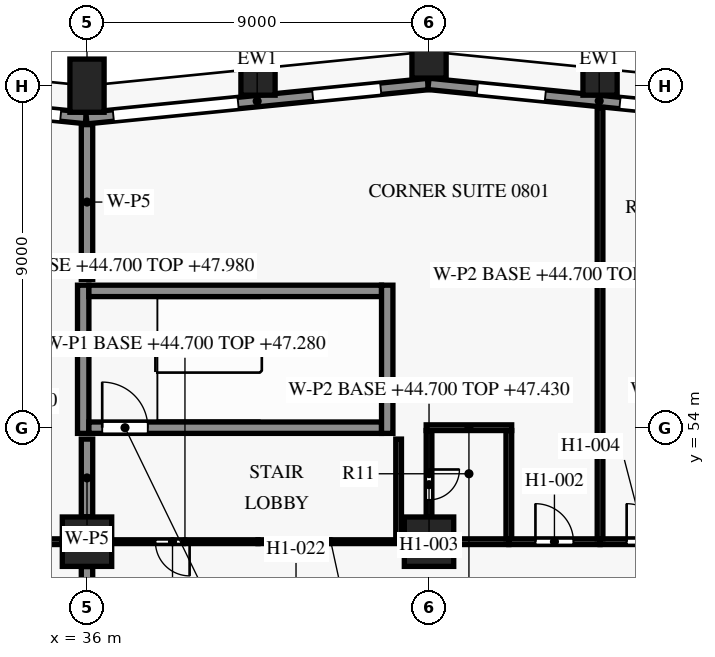
"""IFC4 building model, lengths in metres.
Left out: names, types, materials, properties, quantities, classifications, styles, units other than length and angle.
Written with IfcOpenShell. Run it as: python <this file> out.ifc"""

import sys

from ifc_helpers import new_model, si_unit, direction, frame, frame_2d, origin, origin_2d, place, context, subcontext, project, spatial, rectangle, extrude, element, fill, save


model = new_model("IFC4")
c1 = context("Model", 3, precision=1e-05, world=origin(), true_north=direction((0.0, 1.0)))
c2 = subcontext(c1, "Body", "Model", "MODEL_VIEW")
j1 = project(units=[si_unit("LENGTHUNIT", "METRE"), si_unit("PLANEANGLEUNIT", "RADIAN")], contexts=[c1])
p1 = place(None, origin())
s1 = spatial("IfcSite", under=j1, at=p1, CompositionType="ELEMENT")
p2 = place(p1, origin())
s2 = spatial("IfcBuilding", under=s1, at=p2, CompositionType="ELEMENT")
p3 = place(p2, frame((0.0, 0.0, 44.7)))
s3 = spatial("IfcBuildingStorey", under=s2, at=p3, CompositionType="ELEMENT", Elevation=44.7)
for number, where, z_axis, x_axis in (
    (1, (49.5, 63.45, 0.0), (0.0, 0.0, 1.0), (-0.995, 0.1, 0.0)),
    (2, (45.0, 63.9, 0.0), (0.0, 0.0, 1.0), (-1.0, 0.0, 0.0)),
    (3, (40.5, 63.45, 0.0), (0.0, 0.0, 1.0), (-0.995, -0.1, 0.0)),
    (4, (36.0, 63.0, 0.0), (0.0, 0.0, 1.0), (-1.0, 0.0, 0.0)),
):
    element("IfcColumn", number, at=place(p3, frame(where, z_axis=z_axis, x_axis=x_axis)), inside=s3, PredefinedType="COLUMN", context=c2, shape_type="SweptSolid", body=[
        extrude(rectangle(XDim=0.9, YDim=1.4, at=origin_2d()), origin(), (0.0, 0.0, 1.0), 3.6),
    ])
for number, where, z_axis, x_axis in (
    (5, (36.0, 51.0, 0.0), (0.0, 0.0, 1.0), (1.0, 0.0, 0.0)),
    (6, (45.0, 51.0, 0.0), (0.0, 0.0, 1.0), (1.0, 0.0, 0.0)),
):
    element("IfcColumn", number, at=place(p3, frame(where, z_axis=z_axis, x_axis=x_axis)), inside=s3, PredefinedType="COLUMN", context=c2, shape_type="SweptSolid", body=[
        extrude(rectangle(XDim=1.3, YDim=1.3, at=origin_2d()), origin(), (0.0, 0.0, 1.0), 3.6),
    ])
p4 = place(p3, frame((44.985, 63.047, 0.0), z_axis=(0.0, 0.0, 1.0), x_axis=(0.995035316196, -0.099522457379, 0.0)))
e7 = element("IfcWall", 7, at=p4, inside=s3, PredefinedType="SOLIDWALL", context=c2, shape_type="SweptSolid", body=[
    extrude(rectangle(XDim=9.03, YDim=0.3, at=frame_2d((4.515, 0.0))), origin(), (0.0, 0.0, 1.0), 2.95),
])
p5 = place(p4, frame((1.291, 0.0, 0.75)))
e8 = element("IfcOpeningElement", 8, at=p5, cuts=e7, PredefinedType="OPENING", context=c2, shape_type="SweptSolid", body=[
    extrude(rectangle(XDim=1.8, YDim=1.8, at=frame_2d((0.9, 0.9))), frame((0.0, 0.16, 0.0), z_axis=(0.0, -1.0, 0.0), x_axis=(1.0, 0.0, 0.0)), (0.0, 0.0, 1.0), 0.32),
])
p6 = place(p4, frame((5.064, 0.0, 0.15)))
e9 = element("IfcOpeningElement", 9, at=p6, cuts=e7, PredefinedType="OPENING", context=c2, shape_type="SweptSolid", body=[
    extrude(rectangle(XDim=3.3, YDim=2.4, at=frame_2d((1.65, 1.2))), frame((0.0, 0.16, 0.0), z_axis=(0.0, -1.0, 0.0), x_axis=(1.0, 0.0, 0.0)), (0.0, 0.0, 1.0), 0.32),
])
p7 = place(p3, frame((35.985, 62.144, 0.0), z_axis=(0.0, 0.0, 1.0), x_axis=(0.995037993253, 0.099495688264, 0.0)))
e10 = element("IfcWall", 10, at=p7, inside=s3, PredefinedType="SOLIDWALL", context=c2, shape_type="SweptSolid", body=[
    extrude(rectangle(XDim=9.03, YDim=0.3, at=frame_2d((4.515, 0.0))), origin(), (0.0, 0.0, 1.0), 2.95),
])
p8 = place(p7, frame((0.711, 0.0, 0.15)))
e11 = element("IfcOpeningElement", 11, at=p8, cuts=e10, PredefinedType="OPENING", context=c2, shape_type="SweptSolid", body=[
    extrude(rectangle(XDim=3.3, YDim=2.4, at=frame_2d((1.65, 1.2))), frame((0.0, 0.16, 0.0), z_axis=(0.0, -1.0, 0.0), x_axis=(1.0, 0.0, 0.0)), (0.0, 0.0, 1.0), 0.32),
])
p9 = place(p7, frame((5.984, 0.0, 0.75)))
e12 = element("IfcOpeningElement", 12, at=p9, cuts=e10, PredefinedType="OPENING", context=c2, shape_type="SweptSolid", body=[
    extrude(rectangle(XDim=1.8, YDim=1.8, at=frame_2d((0.9, 0.9))), frame((0.0, 0.16, 0.0), z_axis=(0.0, -1.0, 0.0), x_axis=(1.0, 0.0, 0.0)), (0.0, 0.0, 1.0), 0.32),
])
p10 = place(p3, frame((27.065, 63.039, 0.0), z_axis=(0.0, 0.0, 1.0), x_axis=(0.995036379926, -0.099511821531, 0.0)))
e13 = element("IfcWall", 13, at=p10, inside=s3, PredefinedType="SOLIDWALL", context=c2, shape_type="SweptSolid", body=[
    extrude(rectangle(XDim=8.95, YDim=0.3, at=frame_2d((4.475, 0.0))), origin(), (0.0, 0.0, 1.0), 2.95),
])
p11 = place(p10, frame((1.211, 0.0, 0.75)))
e14 = element("IfcOpeningElement", 14, at=p11, cuts=e13, PredefinedType="OPENING", context=c2, shape_type="SweptSolid", body=[
    extrude(rectangle(XDim=1.8, YDim=1.8, at=frame_2d((0.9, 0.9))), frame((0.0, 0.16, 0.0), z_axis=(0.0, -1.0, 0.0), x_axis=(1.0, 0.0, 0.0)), (0.0, 0.0, 1.0), 0.32),
])
p12 = place(p10, frame((4.984, 0.0, 0.15)))
e15 = element("IfcOpeningElement", 15, at=p12, cuts=e13, PredefinedType="OPENING", context=c2, shape_type="SweptSolid", body=[
    extrude(rectangle(XDim=3.3, YDim=2.4, at=frame_2d((1.65, 1.2))), frame((0.0, 0.16, 0.0), z_axis=(0.0, -1.0, 0.0), x_axis=(1.0, 0.0, 0.0)), (0.0, 0.0, 1.0), 0.32),
])
p13 = place(p3, frame((36.05, 54.0, 0.0), z_axis=(0.0, 0.0, 1.0), x_axis=(1.0, 0.0, 0.0)))
e16 = element("IfcWall", 16, at=p13, inside=s3, PredefinedType="SHEAR", context=c2, shape_type="SweptSolid", body=[
    extrude(rectangle(XDim=7.7, YDim=0.3, at=frame_2d((3.85, 0.0))), origin(), (0.0, 0.0, 1.0), 3.3),
])
p14 = place(p13, frame((0.35, 0.0, 0.0)))
e17 = element("IfcOpeningElement", 17, at=p14, cuts=e16, PredefinedType="OPENING", context=c2, shape_type="SweptSolid", body=[
    extrude(rectangle(XDim=1.2, YDim=2.2, at=frame_2d((0.6, 1.1))), frame((0.0, 0.16, 0.0), z_axis=(0.0, -1.0, 0.0), x_axis=(1.0, 0.0, 0.0)), (0.0, 0.0, 1.0), 0.32),
])
p15 = place(p3, frame((36.05, 57.6, 0.0), z_axis=(0.0, 0.0, 1.0), x_axis=(1.0, 0.0, 0.0)))
e18 = element("IfcWall", 18, at=p15, inside=s3, PredefinedType="SHEAR", context=c2, shape_type="SweptSolid", body=[
    extrude(rectangle(XDim=7.7, YDim=0.3, at=frame_2d((3.85, 0.0))), origin(), (0.0, 0.0, 1.0), 3.3),
])
for number, where, z_axis, x_axis in (
    (19, (35.9, 53.85, 0.0), (0.0, 0.0, 1.0), (0.0, 1.0, 0.0)),
    (20, (43.9, 53.85, 0.0), (0.0, 0.0, 1.0), (0.0, 1.0, 0.0)),
):
    element("IfcWall", number, at=place(p3, frame(where, z_axis=z_axis, x_axis=x_axis)), inside=s3, PredefinedType="SHEAR", context=c2, shape_type="SweptSolid", body=[
        extrude(rectangle(XDim=3.9, YDim=0.3, at=frame_2d((1.95, 0.0))), origin(), (0.0, 0.0, 1.0), 3.3),
    ])
p16 = place(p3, frame((36.0, 50.345, 0.0), z_axis=(0.0, 0.0, 1.0), x_axis=(0.0, -1.0, 0.0)))
e21 = element("IfcWall", 21, at=p16, inside=s3, PredefinedType="PARTITIONING", context=c2, shape_type="SweptSolid", body=[
    extrude(rectangle(XDim=3.295, YDim=0.3, at=frame_2d((1.647, 0.0))), origin(), (0.0, 0.0, 1.0), 2.58),
])
p17 = place(p3, frame((33.6, 51.0, 0.0), z_axis=(0.0, 0.0, 1.0), x_axis=(1.0, 0.0, 0.0)))
e22 = element("IfcWall", 22, at=p17, inside=s3, PredefinedType="PARTITIONING", context=c2, shape_type="SweptSolid", body=[
    extrude(rectangle(XDim=1.745, YDim=0.15, at=frame_2d((0.873, 0.0))), origin(), (0.0, 0.0, 1.0), 3.28),
])
p18 = place(p3, frame((40.5, 51.0, 0.0), z_axis=(0.0, 0.0, 1.0), x_axis=(-1.0, 0.0, 0.0)))
e23 = element("IfcWall", 23, at=p18, inside=s3, PredefinedType="PARTITIONING", context=c2, shape_type="SweptSolid", body=[
    extrude(rectangle(XDim=3.845, YDim=0.1, at=frame_2d((1.922, 0.0))), origin(), (0.0, 0.0, 1.0), 2.58),
])
p19 = place(p18, frame((1.8, 0.0, 0.0)))
e24 = element("IfcOpeningElement", 24, at=p19, cuts=e23, PredefinedType="OPENING", context=c2, shape_type="SweptSolid", body=[
    extrude(rectangle(XDim=0.9, YDim=2.1, at=frame_2d((0.45, 1.05))), frame((0.0, 0.06, 0.0), z_axis=(0.0, -1.0, 0.0), x_axis=(1.0, 0.0, 0.0)), (0.0, 0.0, 1.0), 0.12),
])
p20 = place(p3, frame((44.33, 51.0, 0.0), z_axis=(0.0, 0.0, 1.0), x_axis=(-1.0, 0.0, 0.0)))
e25 = element("IfcWall", 25, at=p20, inside=s3, PredefinedType="PARTITIONING", context=c2, shape_type="SweptSolid", body=[
    extrude(rectangle(XDim=3.83, YDim=0.1, at=frame_2d((1.915, 0.0))), origin(), (0.0, 0.0, 1.0), 2.58),
])
p21 = place(p3, frame((45.655, 51.0, 0.0), z_axis=(0.0, 0.0, 1.0), x_axis=(1.0, 0.0, 0.0)))
e26 = element("IfcWall", 26, at=p21, inside=s3, PredefinedType="PARTITIONING", context=c2, shape_type="SweptSolid", body=[
    extrude(rectangle(XDim=1.445, YDim=0.15, at=frame_2d((0.723, 0.0))), origin(), (0.0, 0.0, 1.0), 2.58),
])
p22 = place(p3, frame((47.1, 51.0, 0.0), z_axis=(0.0, 0.0, 1.0), x_axis=(1.0, 0.0, 0.0)))
e27 = element("IfcWall", 27, at=p22, inside=s3, PredefinedType="PARTITIONING", context=c2, shape_type="SweptSolid", body=[
    extrude(rectangle(XDim=2.4, YDim=0.15, at=frame_2d((1.2, 0.0))), origin(), (0.0, 0.0, 1.0), 2.58),
])
p23 = place(p22, frame((0.7, 0.0, 0.0)))
e28 = element("IfcOpeningElement", 28, at=p23, cuts=e27, PredefinedType="OPENING", context=c2, shape_type="SweptSolid", body=[
    extrude(rectangle(XDim=1.0, YDim=2.1, at=frame_2d((0.5, 1.05))), frame((0.0, 0.085, 0.0), z_axis=(0.0, -1.0, 0.0), x_axis=(1.0, 0.0, 0.0)), (0.0, 0.0, 1.0), 0.17),
])
p24 = place(p3, frame((49.5, 51.0, 0.0), z_axis=(0.0, 0.0, 1.0), x_axis=(1.0, 0.0, 0.0)))
e29 = element("IfcWall", 29, at=p24, inside=s3, PredefinedType="PARTITIONING", context=c2, shape_type="SweptSolid", body=[
    extrude(rectangle(XDim=2.4, YDim=0.15, at=frame_2d((1.2, 0.0))), origin(), (0.0, 0.0, 1.0), 2.58),
])
p25 = place(p24, frame((0.7, 0.0, 0.0)))
e30 = element("IfcOpeningElement", 30, at=p25, cuts=e29, PredefinedType="OPENING", context=c2, shape_type="SweptSolid", body=[
    extrude(rectangle(XDim=1.0, YDim=2.1, at=frame_2d((0.5, 1.05))), frame((0.0, 0.085, 0.0), z_axis=(0.0, -1.0, 0.0), x_axis=(1.0, 0.0, 0.0)), (0.0, 0.0, 1.0), 0.17),
])
p26 = place(p3, frame((47.1, 51.075, 0.0), z_axis=(0.0, 0.0, 1.0), x_axis=(0.0, 1.0, 0.0)))
e31 = element("IfcWall", 31, at=p26, inside=s3, PredefinedType="PARTITIONING", context=c2, shape_type="SweptSolid", body=[
    extrude(rectangle(XDim=2.85, YDim=0.15, at=frame_2d((1.425, 0.0))), origin(), (0.0, 0.0, 1.0), 2.58),
])
p27 = place(p3, frame((36.0, 53.7, 0.0), z_axis=(0.0, 0.0, 1.0), x_axis=(0.0, -1.0, 0.0)))
e32 = element("IfcWall", 32, at=p27, inside=s3, PredefinedType="PARTITIONING", context=c2, shape_type="SweptSolid", body=[
    extrude(rectangle(XDim=2.045, YDim=0.3, at=frame_2d((1.022, 0.0))), origin(), (0.0, 0.0, 1.0), 2.58),
])
p28 = place(p3, frame((44.2, 53.7, 0.0), z_axis=(0.0, 0.0, 1.0), x_axis=(0.0, -1.0, 0.0)))
e33 = element("IfcWall", 33, at=p28, inside=s3, PredefinedType="PARTITIONING", context=c2, shape_type="SweptSolid", body=[
    extrude(rectangle(XDim=2.625, YDim=0.15, at=frame_2d((1.312, 0.0))), origin(), (0.0, 0.0, 1.0), 2.58),
])
p29 = place(p3, frame((45.0, 53.925, 0.0), z_axis=(0.0, 0.0, 1.0), x_axis=(0.0, -1.0, 0.0)))
e34 = element("IfcWall", 34, at=p29, inside=s3, PredefinedType="PARTITIONING", context=c2, shape_type="SweptSolid", body=[
    extrude(rectangle(XDim=2.27, YDim=0.15, at=frame_2d((1.135, 0.0))), origin(), (0.0, 0.0, 1.0), 2.73),
])
p30 = place(p29, frame((1.025, 0.0, 0.0)))
e35 = element("IfcOpeningElement", 35, at=p30, cuts=e34, PredefinedType="OPENING", context=c2, shape_type="SweptSolid", body=[
    extrude(rectangle(XDim=0.8, YDim=2.1, at=frame_2d((0.4, 1.05))), frame((0.0, 0.085, 0.0), z_axis=(0.0, -1.0, 0.0), x_axis=(1.0, 0.0, 0.0)), (0.0, 0.0, 1.0), 0.17),
])
p31 = place(p3, frame((47.175, 54.0, 0.0), z_axis=(0.0, 0.0, 1.0), x_axis=(-1.0, 0.0, 0.0)))
e36 = element("IfcWall", 36, at=p31, inside=s3, PredefinedType="PARTITIONING", context=c2, shape_type="SweptSolid", body=[
    extrude(rectangle(XDim=2.25, YDim=0.15, at=frame_2d((1.125, 0.0))), origin(), (0.0, 0.0, 1.0), 2.73),
])
p32 = place(p3, frame((36.0, 61.975, 0.0), z_axis=(0.0, 0.0, 1.0), x_axis=(0.0, -1.0, 0.0)))
e37 = element("IfcWall", 37, at=p32, inside=s3, PredefinedType="PARTITIONING", context=c2, shape_type="SweptSolid", body=[
    extrude(rectangle(XDim=4.075, YDim=0.3, at=frame_2d((2.038, 0.0))), origin(), (0.0, 0.0, 1.0), 2.58),
])
p33 = place(p3, frame((49.5, 62.425, 0.0), z_axis=(0.0, 0.0, 1.0), x_axis=(0.0, -1.0, 0.0)))
e38 = element("IfcWall", 38, at=p33, inside=s3, PredefinedType="PARTITIONING", context=c2, shape_type="SweptSolid", body=[
    extrude(rectangle(XDim=11.35, YDim=0.15, at=frame_2d((5.675, 0.0))), origin(), (0.0, 0.0, 1.0), 2.58),
])
p34 = place(p5, origin())
e39 = element("IfcWindow", 39, at=p34, inside=s3, PartitioningType="SINGLE_PANEL", PredefinedType="WINDOW", context=c2, shape_type="SweptSolid", body=[
    extrude(rectangle(XDim=1.8, YDim=1.8, at=frame_2d((0.9, 0.9))), frame((0.0, 0.03, 0.0), z_axis=(0.0, -1.0, 0.0), x_axis=(1.0, 0.0, 0.0)), (0.0, 0.0, 1.0), 0.06),
])
fill(e8, e39)
p35 = place(p6, origin())
e40 = element("IfcWindow", 40, at=p35, inside=s3, PartitioningType="SINGLE_PANEL", PredefinedType="WINDOW", context=c2, shape_type="SweptSolid", body=[
    extrude(rectangle(XDim=3.3, YDim=2.4, at=frame_2d((1.65, 1.2))), frame((0.0, 0.03, 0.0), z_axis=(0.0, -1.0, 0.0), x_axis=(1.0, 0.0, 0.0)), (0.0, 0.0, 1.0), 0.06),
])
fill(e9, e40)
p36 = place(p8, origin())
e41 = element("IfcWindow", 41, at=p36, inside=s3, PartitioningType="SINGLE_PANEL", PredefinedType="WINDOW", context=c2, shape_type="SweptSolid", body=[
    extrude(rectangle(XDim=3.3, YDim=2.4, at=frame_2d((1.65, 1.2))), frame((0.0, 0.03, 0.0), z_axis=(0.0, -1.0, 0.0), x_axis=(1.0, 0.0, 0.0)), (0.0, 0.0, 1.0), 0.06),
])
fill(e11, e41)
p37 = place(p9, origin())
e42 = element("IfcWindow", 42, at=p37, inside=s3, PartitioningType="SINGLE_PANEL", PredefinedType="WINDOW", context=c2, shape_type="SweptSolid", body=[
    extrude(rectangle(XDim=1.8, YDim=1.8, at=frame_2d((0.9, 0.9))), frame((0.0, 0.03, 0.0), z_axis=(0.0, -1.0, 0.0), x_axis=(1.0, 0.0, 0.0)), (0.0, 0.0, 1.0), 0.06),
])
fill(e12, e42)
p38 = place(p12, origin())
e43 = element("IfcWindow", 43, at=p38, inside=s3, PartitioningType="SINGLE_PANEL", PredefinedType="WINDOW", context=c2, shape_type="SweptSolid", body=[
    extrude(rectangle(XDim=3.3, YDim=2.4, at=frame_2d((1.65, 1.2))), frame((0.0, 0.03, 0.0), z_axis=(0.0, -1.0, 0.0), x_axis=(1.0, 0.0, 0.0)), (0.0, 0.0, 1.0), 0.06),
])
fill(e15, e43)
p39 = place(p14, origin())
e44 = element("IfcDoor", 44, at=p39, inside=s3, OperationType="SINGLE_SWING_LEFT", PredefinedType="DOOR", context=c2, shape_type="SweptSolid", body=[
    extrude(rectangle(XDim=1.2, YDim=2.2, at=frame_2d((0.6, 1.1))), frame((0.0, 0.025, 0.0), z_axis=(0.0, -1.0, 0.0), x_axis=(1.0, 0.0, 0.0)), (0.0, 0.0, 1.0), 0.05),
])
fill(e17, e44)
p40 = place(p19, origin())
e45 = element("IfcDoor", 45, at=p40, inside=s3, OperationType="SINGLE_SWING_LEFT", PredefinedType="DOOR", context=c2, shape_type="SweptSolid", body=[
    extrude(rectangle(XDim=0.9, YDim=2.1, at=frame_2d((0.45, 1.05))), frame((0.0, 0.025, 0.0), z_axis=(0.0, -1.0, 0.0), x_axis=(1.0, 0.0, 0.0)), (0.0, 0.0, 1.0), 0.05),
])
fill(e24, e45)
p41 = place(p23, origin())
e46 = element("IfcDoor", 46, at=p41, inside=s3, OperationType="SINGLE_SWING_LEFT", PredefinedType="DOOR", context=c2, shape_type="SweptSolid", body=[
    extrude(rectangle(XDim=1.0, YDim=2.1, at=frame_2d((0.5, 1.05))), frame((0.0, 0.025, 0.0), z_axis=(0.0, -1.0, 0.0), x_axis=(1.0, 0.0, 0.0)), (0.0, 0.0, 1.0), 0.05),
])
fill(e28, e46)
p42 = place(p30, origin())
e47 = element("IfcDoor", 47, at=p42, inside=s3, OperationType="SINGLE_SWING_RIGHT", PredefinedType="DOOR", context=c2, shape_type="SweptSolid", body=[
    extrude(rectangle(XDim=0.8, YDim=2.1, at=frame_2d((0.4, 1.05))), frame((0.0, 0.025, 0.0), z_axis=(0.0, -1.0, 0.0), x_axis=(1.0, 0.0, 0.0)), (0.0, 0.0, 1.0), 0.05),
])
fill(e35, e47)
p43 = place(p25, origin())
e48 = element("IfcDoor", 48, at=p43, inside=s3, OperationType="SINGLE_SWING_LEFT", PredefinedType="DOOR", context=c2, shape_type="SweptSolid", body=[
    extrude(rectangle(XDim=1.0, YDim=2.1, at=frame_2d((0.5, 1.05))), frame((0.0, 0.025, 0.0), z_axis=(0.0, -1.0, 0.0), x_axis=(1.0, 0.0, 0.0)), (0.0, 0.0, 1.0), 0.05),
])
fill(e30, e48)
save(model, sys.argv[1])
